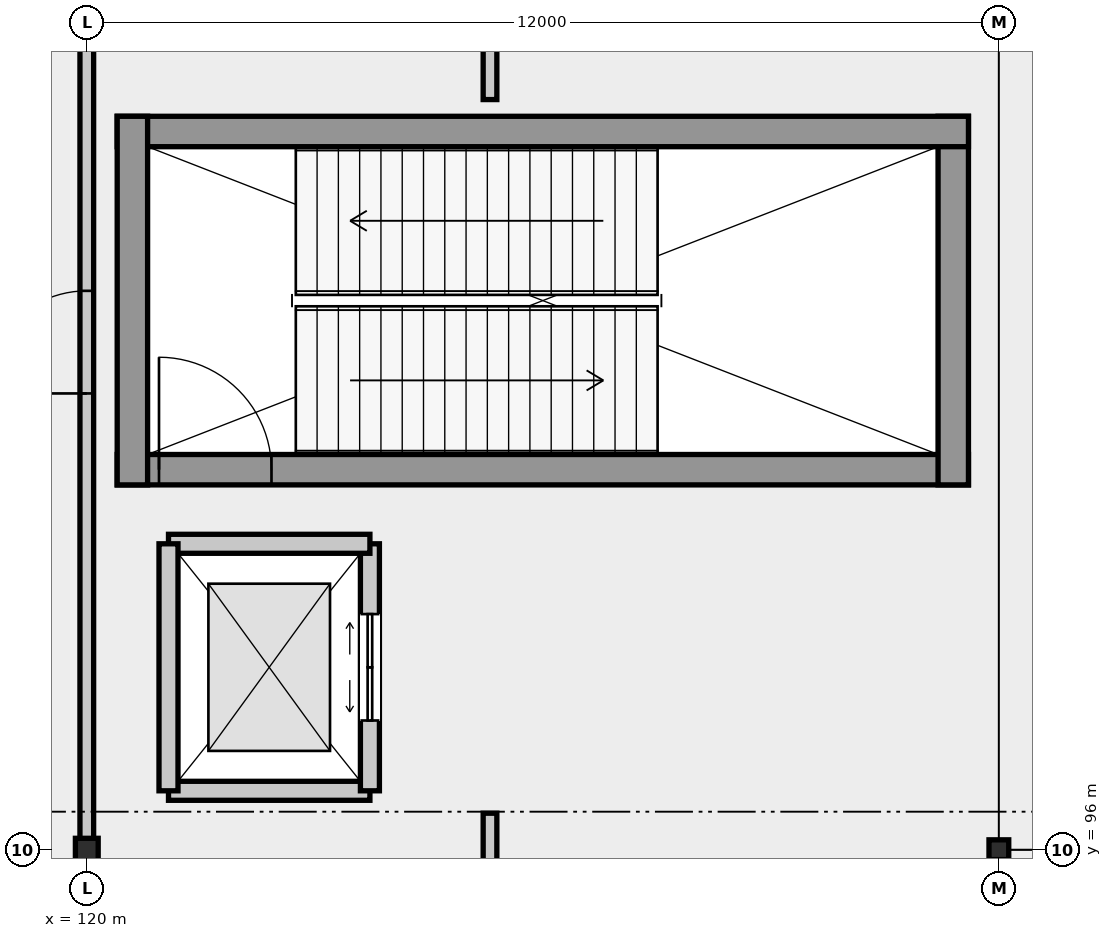
"""IFC4 building model, lengths in metres.
Left out: names, types, materials, properties, quantities, classifications, styles, units other than length and angle.
Written with IfcOpenShell. Run it as: python <this file> out.ifc"""

import sys

from ifc_helpers import new_model, si_unit, direction, frame, frame_2d, origin, origin_2d, place, context, subcontext, project, spatial, rectangle, i_section, extrude, element, fill, save


model = new_model("IFC4")
c1 = context("Model", 3, precision=1e-05, world=origin(), true_north=direction((0.0, 1.0)))
c2 = subcontext(c1, "Body", "Model", "MODEL_VIEW")
j1 = project(units=[si_unit("LENGTHUNIT", "METRE"), si_unit("PLANEANGLEUNIT", "RADIAN")], contexts=[c1])
p1 = place(None, origin())
s1 = spatial("IfcSite", under=j1, at=p1, CompositionType="ELEMENT")
p2 = place(p1, origin())
s2 = spatial("IfcBuilding", under=s1, at=p2, CompositionType="ELEMENT")
p3 = place(p2, frame((0.0, 0.0, 16.8)))
s3 = spatial("IfcBuildingStorey", under=s2, at=p3, CompositionType="ELEMENT", Elevation=16.8)
p4 = place(p3, frame((120.0, 96.0, 0.0), z_axis=(0.0, 0.0, 1.0), x_axis=(1.0, 0.0, 0.0)))
e1 = element("IfcColumn", 1, at=p4, inside=s3, PredefinedType="COLUMN", context=c2, shape_type="SweptSolid", body=[
    extrude(i_section(OverallWidth=0.3, OverallDepth=0.3, WebThickness=0.011, FlangeThickness=0.019, FilletRadius=0.027, at=origin_2d()), origin(), (0.0, 0.0, 1.0), 6.6),
])
p5 = place(p3, frame((132.0, 96.0, 0.0), z_axis=(0.0, 0.0, 1.0), x_axis=(1.0, 0.0, 0.0)))
e2 = element("IfcColumn", 2, at=p5, inside=s3, PredefinedType="COLUMN", context=c2, shape_type="SweptSolid", body=[
    extrude(i_section(OverallWidth=0.26, OverallDepth=0.26, WebThickness=0.01, FlangeThickness=0.018, FilletRadius=0.024, at=origin_2d()), origin(), (0.0, 0.0, 1.0), 6.6),
])
p6 = place(p3, frame((120.4, 101.0, 0.0), z_axis=(0.0, 0.0, 1.0), x_axis=(1.0, 0.0, 0.0)))
e3 = element("IfcWall", 3, at=p6, inside=s3, PredefinedType="SHEAR", context=c2, shape_type="SweptSolid", body=[
    extrude(rectangle(XDim=11.2, YDim=0.4, at=frame_2d((5.6, 0.0))), origin(), (0.0, 0.0, 1.0), 6.35),
])
p7 = place(p6, frame((0.55, 0.0, 0.0)))
e4 = element("IfcOpeningElement", 4, at=p7, cuts=e3, PredefinedType="OPENING", context=c2, shape_type="SweptSolid", body=[
    extrude(rectangle(XDim=1.48, YDim=2.3, at=frame_2d((0.74, 1.15))), frame((0.0, 0.21, 0.0), z_axis=(0.0, -1.0, 0.0), x_axis=(1.0, 0.0, 0.0)), (0.0, 0.0, 1.0), 0.42),
])
p8 = place(p3, frame((131.4, 100.8, 0.0), z_axis=(0.0, 0.0, 1.0), x_axis=(0.0, 1.0, 0.0)))
e5 = element("IfcWall", 5, at=p8, inside=s3, PredefinedType="SHEAR", context=c2, shape_type="SweptSolid", body=[
    extrude(rectangle(XDim=4.85, YDim=0.4, at=frame_2d((2.425, 0.0))), origin(), (0.0, 0.0, 1.0), 6.35),
])
p9 = place(p3, frame((131.6, 105.45, 0.0), z_axis=(0.0, 0.0, 1.0), x_axis=(-1.0, 0.0, 0.0)))
e6 = element("IfcWall", 6, at=p9, inside=s3, PredefinedType="SHEAR", context=c2, shape_type="SweptSolid", body=[
    extrude(rectangle(XDim=11.2, YDim=0.4, at=frame_2d((5.6, 0.0))), origin(), (0.0, 0.0, 1.0), 6.35),
])
p10 = place(p3, frame((120.6, 105.65, 0.0), z_axis=(0.0, 0.0, 1.0), x_axis=(0.0, -1.0, 0.0)))
e7 = element("IfcWall", 7, at=p10, inside=s3, PredefinedType="SHEAR", context=c2, shape_type="SweptSolid", body=[
    extrude(rectangle(XDim=4.85, YDim=0.4, at=frame_2d((2.425, 0.0))), origin(), (0.0, 0.0, 1.0), 6.35),
])
p11 = place(p3, frame((121.075, 96.775, 0.0), z_axis=(0.0, 0.0, 1.0), x_axis=(1.0, 0.0, 0.0)))
e8 = element("IfcWall", 8, at=p11, inside=s3, PredefinedType="SOLIDWALL", context=c2, shape_type="SweptSolid", body=[
    extrude(rectangle(XDim=2.65, YDim=0.25, at=frame_2d((1.325, 0.0))), origin(), (0.0, 0.0, 1.0), 6.35),
])
p12 = place(p3, frame((123.725, 96.775, 0.0), z_axis=(0.0, 0.0, 1.0), x_axis=(0.0, 1.0, 0.0)))
e9 = element("IfcWall", 9, at=p12, inside=s3, PredefinedType="SOLIDWALL", context=c2, shape_type="SweptSolid", body=[
    extrude(rectangle(XDim=3.25, YDim=0.25, at=frame_2d((1.625, 0.0))), origin(), (0.0, 0.0, 1.0), 6.35),
])
p13 = place(p12, frame((0.925, 0.0, 0.0)))
e10 = element("IfcOpeningElement", 10, at=p13, cuts=e9, PredefinedType="OPENING", context=c2, shape_type="SweptSolid", body=[
    extrude(rectangle(XDim=1.4, YDim=2.3, at=frame_2d((0.7, 1.15))), frame((0.0, 0.135, 0.0), z_axis=(0.0, -1.0, 0.0), x_axis=(1.0, 0.0, 0.0)), (0.0, 0.0, 1.0), 0.27),
])
p14 = place(p3, frame((123.725, 100.025, 0.0), z_axis=(0.0, 0.0, 1.0), x_axis=(-1.0, 0.0, 0.0)))
e11 = element("IfcWall", 11, at=p14, inside=s3, PredefinedType="SOLIDWALL", context=c2, shape_type="SweptSolid", body=[
    extrude(rectangle(XDim=2.65, YDim=0.25, at=frame_2d((1.325, 0.0))), origin(), (0.0, 0.0, 1.0), 6.35),
])
p15 = place(p3, frame((121.075, 100.025, 0.0), z_axis=(0.0, 0.0, 1.0), x_axis=(0.0, -1.0, 0.0)))
e12 = element("IfcWall", 12, at=p15, inside=s3, PredefinedType="SOLIDWALL", context=c2, shape_type="SweptSolid", body=[
    extrude(rectangle(XDim=3.25, YDim=0.25, at=frame_2d((1.625, 0.0))), origin(), (0.0, 0.0, 1.0), 6.35),
])
p16 = place(p3, frame((120.0, 91.562, 0.0), z_axis=(0.0, 0.0, 1.0), x_axis=(0.0, 1.0, 0.0)))
e13 = element("IfcWall", 13, at=p16, inside=s3, PredefinedType="PARTITIONING", context=c2, shape_type="SweptSolid", body=[
    extrude(rectangle(XDim=15.88, YDim=0.18, at=frame_2d((7.94, 0.0))), origin(), (0.0, 0.0, 1.0), 5.87),
])
p17 = place(p16, frame((10.441, 0.0, 0.0)))
e14 = element("IfcOpeningElement", 14, at=p17, cuts=e13, PredefinedType="OPENING", context=c2, shape_type="SweptSolid", body=[
    extrude(rectangle(XDim=1.35, YDim=2.3, at=frame_2d((0.675, 1.15))), frame((0.0, 0.1, 0.0), z_axis=(0.0, -1.0, 0.0), x_axis=(1.0, 0.0, 0.0)), (0.0, 0.0, 1.0), 0.2),
])
p18 = place(p3, frame((125.305, 93.87, 0.0), z_axis=(0.0, 0.0, 1.0), x_axis=(0.0, 1.0, 0.0)))
e15 = element("IfcWall", 15, at=p18, inside=s3, PredefinedType="PARTITIONING", context=c2, shape_type="SweptSolid", body=[
    extrude(rectangle(XDim=2.61, YDim=0.18, at=frame_2d((1.305, 0.0))), origin(), (0.0, 0.0, 1.0), 5.87),
])
p19 = place(p18, frame((0.65, 0.0, 0.0)))
e16 = element("IfcOpeningElement", 16, at=p19, cuts=e15, PredefinedType="OPENING", context=c2, shape_type="SweptSolid", body=[
    extrude(rectangle(XDim=1.05, YDim=2.2, at=frame_2d((0.525, 1.1))), frame((0.0, 0.1, 0.0), z_axis=(0.0, -1.0, 0.0), x_axis=(1.0, 0.0, 0.0)), (0.0, 0.0, 1.0), 0.2),
])
p20 = place(p3, frame((125.305, 105.87, 0.0), z_axis=(0.0, 0.0, 1.0), x_axis=(0.0, 1.0, 0.0)))
e17 = element("IfcWall", 17, at=p20, inside=s3, PredefinedType="PARTITIONING", context=c2, shape_type="SweptSolid", body=[
    extrude(rectangle(XDim=1.75, YDim=0.18, at=frame_2d((0.875, 0.0))), origin(), (0.0, 0.0, 1.0), 6.31),
])
p21 = place(p7, origin())
e18 = element("IfcDoor", 18, at=p21, inside=s3, OperationType="DOUBLE_DOOR_SINGLE_SWING", PredefinedType="DOOR", context=c2, shape_type="SweptSolid", body=[
    extrude(rectangle(XDim=1.48, YDim=2.3, at=frame_2d((0.74, 1.15))), frame((0.0, 0.025, 0.0), z_axis=(0.0, -1.0, 0.0), x_axis=(1.0, 0.0, 0.0)), (0.0, 0.0, 1.0), 0.05),
])
fill(e4, e18)
p22 = place(p13, origin())
e19 = element("IfcDoor", 19, at=p22, inside=s3, OperationType="SLIDING_TO_LEFT", PredefinedType="DOOR", context=c2, shape_type="SweptSolid", body=[
    extrude(rectangle(XDim=1.4, YDim=2.3, at=frame_2d((0.7, 1.15))), frame((0.0, 0.025, 0.0), z_axis=(0.0, -1.0, 0.0), x_axis=(1.0, 0.0, 0.0)), (0.0, 0.0, 1.0), 0.05),
])
fill(e10, e19)
p23 = place(p17, origin())
e20 = element("IfcDoor", 20, at=p23, inside=s3, OperationType="DOUBLE_SWING_LEFT", PredefinedType="DOOR", context=c2, shape_type="SweptSolid", body=[
    extrude(rectangle(XDim=1.35, YDim=2.3, at=frame_2d((0.675, 1.15))), frame((0.0, 0.025, 0.0), z_axis=(0.0, -1.0, 0.0), x_axis=(1.0, 0.0, 0.0)), (0.0, 0.0, 1.0), 0.05),
])
fill(e14, e20)
save(model, sys.argv[1])
